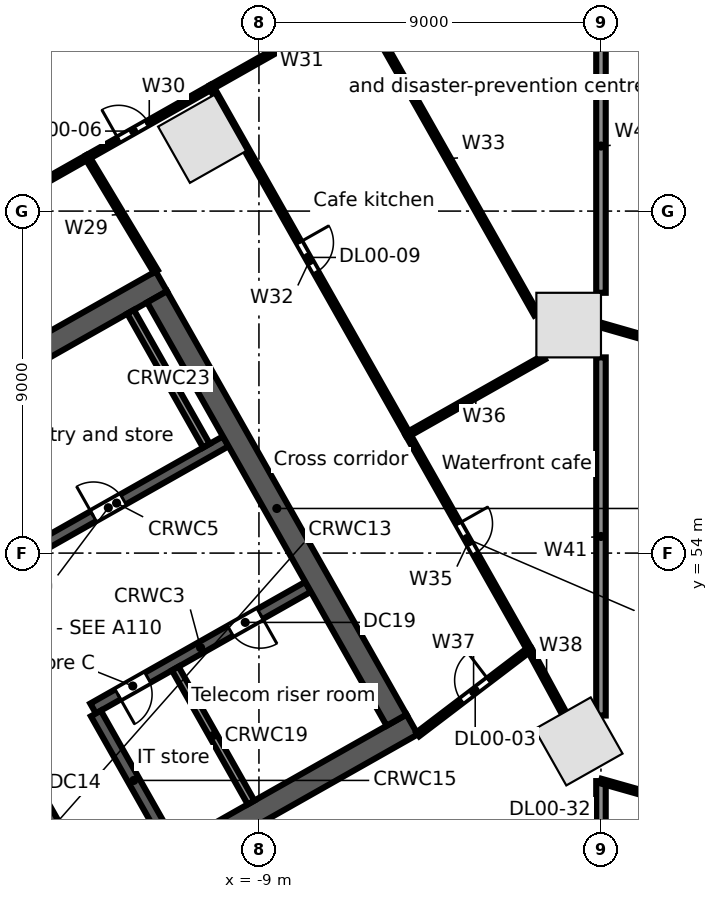
"""IFC4 building model, lengths in metres.
Left out: names, types, materials, properties, quantities, classifications, styles, units other than length and angle.
Written with IfcOpenShell. Run it as: python <this file> out.ifc"""

import sys

from ifc_helpers import new_model, si_unit, direction, frame, frame_2d, origin, origin_2d, place, context, subcontext, project, spatial, rectangle, extrude, element, fill, save


model = new_model("IFC4")
c1 = context("Model", 3, precision=1e-05, world=origin(), true_north=direction((0.0, 1.0)))
c2 = subcontext(c1, "Body", "Model", "MODEL_VIEW")
j1 = project(units=[si_unit("LENGTHUNIT", "METRE"), si_unit("PLANEANGLEUNIT", "RADIAN")], contexts=[c1])
p1 = place(None, origin())
s1 = spatial("IfcSite", under=j1, at=p1, CompositionType="ELEMENT")
p2 = place(p1, origin())
s2 = spatial("IfcBuilding", under=s1, at=p2, CompositionType="ELEMENT")
p3 = place(p2, origin())
s3 = spatial("IfcBuildingStorey", under=s2, at=p3, CompositionType="ELEMENT", Elevation=0.0)
for number, where, z_axis, x_axis in (
    (1, (-10.495, 64.902, 0.0), (0.0, 0.0, 1.0), (-0.87, -0.492, 0.0)),
    (2, (-0.591, 49.044, 0.0), (0.0, 0.0, 1.0), (0.87, 0.492, 0.0)),
    (3, (-0.85, 60.0, 0.0), (0.0, 0.0, 1.0), (0.0, 1.0, 0.0)),
):
    element("IfcColumn", number, at=place(p3, frame(where, z_axis=z_axis, x_axis=x_axis)), inside=s3, PredefinedType="COLUMN", context=c2, shape_type="SweptSolid", body=[
        extrude(rectangle(XDim=1.7, YDim=1.7, at=origin_2d()), origin(), (0.0, 0.0, 1.0), 6.5),
    ])
p4 = place(p3, frame((-63.707, 41.701, 0.0), z_axis=(0.0, 0.0, 1.0), x_axis=(0.870355510268, 0.492423888277, 0.0)))
e4 = element("IfcWall", 4, at=p4, inside=s3, PredefinedType="STANDARD", context=c2, shape_type="SweptSolid", body=[
    extrude(rectangle(XDim=67.903, YDim=0.3, at=frame_2d((33.952, 0.0))), origin(), (0.0, 0.0, 1.0), 6.15),
])
p5 = place(p4, frame((44.274, 0.0, 0.0)))
e5 = element("IfcOpeningElement", 5, at=p5, cuts=e4, PredefinedType="OPENING", context=c2, shape_type="SweptSolid", body=[
    extrude(rectangle(XDim=1.2, YDim=2.4, at=frame_2d((0.6, 1.2))), frame((0.0, 0.16, 0.0), z_axis=(0.0, -1.0, 0.0), x_axis=(1.0, 0.0, 0.0)), (0.0, 0.0, 1.0), 0.32),
])
p6 = place(p4, frame((15.222, 0.0, 0.0)))
e6 = element("IfcOpeningElement", 6, at=p6, cuts=e4, PredefinedType="OPENING", context=c2, shape_type="SweptSolid", body=[
    extrude(rectangle(XDim=1.2, YDim=2.4, at=frame_2d((0.6, 1.2))), frame((0.0, 0.16, 0.0), z_axis=(0.0, -1.0, 0.0), x_axis=(1.0, 0.0, 0.0)), (0.0, 0.0, 1.0), 0.32),
])
p7 = place(p3, frame((-18.024, 42.104, 0.0), z_axis=(0.0, 0.0, 1.0), x_axis=(0.870360574057, 0.492414937962, 0.0)))
e7 = element("IfcWall", 7, at=p7, inside=s3, PredefinedType="SOLIDWALL", context=c2, shape_type="SweptSolid", body=[
    extrude(rectangle(XDim=15.0, YDim=0.6, at=frame_2d((7.5, 0.0))), origin(), (0.0, 0.0, 1.0), 6.15),
])
p8 = place(p7, frame((6.1, 0.0, 0.0)))
e8 = element("IfcOpeningElement", 8, at=p8, cuts=e7, PredefinedType="OPENING", context=c2, shape_type="SweptSolid", body=[
    extrude(rectangle(XDim=1.2, YDim=2.1, at=frame_2d((0.6, 1.05))), frame((0.0, 0.31, 0.0), z_axis=(0.0, -1.0, 0.0), x_axis=(1.0, 0.0, 0.0)), (0.0, 0.0, 1.0), 0.62),
])
p9 = place(p3, frame((-13.365, 49.911, 0.0), z_axis=(0.0, 0.0, 1.0), x_axis=(0.870340995471, 0.49244954219, 0.0)))
e9 = element("IfcWall", 9, at=p9, inside=s3, PredefinedType="SOLIDWALL", context=c2, shape_type="SweptSolid", body=[
    extrude(rectangle(XDim=6.5, YDim=0.3, at=frame_2d((3.25, 0.0))), origin(), (0.0, 0.0, 1.0), 6.15),
])
p10 = place(p9, frame((0.75, 0.0, 0.0)))
e10 = element("IfcOpeningElement", 10, at=p10, cuts=e9, PredefinedType="OPENING", context=c2, shape_type="SweptSolid", body=[
    extrude(rectangle(XDim=0.9, YDim=2.1, at=frame_2d((0.45, 1.05))), frame((0.0, 0.16, 0.0), z_axis=(0.0, -1.0, 0.0), x_axis=(1.0, 0.0, 0.0)), (0.0, 0.0, 1.0), 0.32),
])
p11 = place(p9, frame((4.15, 0.0, 0.0)))
e11 = element("IfcOpeningElement", 11, at=p11, cuts=e9, PredefinedType="OPENING", context=c2, shape_type="SweptSolid", body=[
    extrude(rectangle(XDim=0.9, YDim=2.1, at=frame_2d((0.45, 1.05))), frame((0.0, 0.16, 0.0), z_axis=(0.0, -1.0, 0.0), x_axis=(1.0, 0.0, 0.0)), (0.0, 0.0, 1.0), 0.32),
])
p12 = place(p3, frame((-15.618, 53.691, 0.0), z_axis=(0.0, 0.0, 1.0), x_axis=(0.870356769198, 0.492421663121, 0.0)))
e12 = element("IfcWall", 12, at=p12, inside=s3, PredefinedType="SOLIDWALL", context=c2, shape_type="SweptSolid", body=[
    extrude(rectangle(XDim=6.6, YDim=0.3, at=frame_2d((3.3, 0.0))), origin(), (0.0, 0.0, 1.0), 6.15),
])
p13 = place(p12, frame((2.6, 0.0, 0.0)))
e13 = element("IfcOpeningElement", 13, at=p13, cuts=e12, PredefinedType="OPENING", context=c2, shape_type="SweptSolid", body=[
    extrude(rectangle(XDim=0.9, YDim=2.1, at=frame_2d((0.45, 1.05))), frame((0.0, 0.16, 0.0), z_axis=(0.0, -1.0, 0.0), x_axis=(1.0, 0.0, 0.0)), (0.0, 0.0, 1.0), 0.32),
])
p14 = place(p3, frame((-24.623, 53.767, 0.0), z_axis=(0.0, 0.0, 1.0), x_axis=(0.870356627484, 0.492421913601, 0.0)))
e14 = element("IfcWall", 14, at=p14, inside=s3, PredefinedType="SOLIDWALL", context=c2, shape_type="SweptSolid", body=[
    extrude(rectangle(XDim=15.0, YDim=0.6, at=frame_2d((7.5, 0.0))), origin(), (0.0, 0.0, 1.0), 6.15),
])
p15 = place(p3, frame((-16.076, 48.205, 0.0), z_axis=(0.0, 0.0, 1.0), x_axis=(0.492394910396, -0.870371904542, 0.0)))
e15 = element("IfcWall", 15, at=p15, inside=s3, PredefinedType="SOLIDWALL", context=c2, shape_type="SweptSolid", body=[
    extrude(rectangle(XDim=4.05, YDim=0.2, at=frame_2d((2.025, 0.0))), origin(), (0.0, 0.0, 1.0), 6.15),
])
for number, where, z_axis, x_axis in (
    (16, (-15.379, 48.599, 0.0), (0.0, 0.0, 1.0), (0.492, -0.87, 0.0)),
    (17, (-13.291, 49.781, 0.0), (0.0, 0.0, 1.0), (0.492, -0.87, 0.0)),
):
    element("IfcWall", number, at=place(p3, frame(where, z_axis=z_axis, x_axis=x_axis)), inside=s3, PredefinedType="SOLIDWALL", context=c2, shape_type="SweptSolid", body=[
        extrude(rectangle(XDim=4.05, YDim=0.3, at=frame_2d((2.025, 0.0))), origin(), (0.0, 0.0, 1.0), 6.15),
    ])
p16 = place(p3, frame((-11.202, 50.962, 0.0), z_axis=(0.0, 0.0, 1.0), x_axis=(0.49241474071, -0.870360685654, 0.0)))
e18 = element("IfcWall", 18, at=p16, inside=s3, PredefinedType="PARTITIONING", context=c2, shape_type="SweptSolid", body=[
    extrude(rectangle(XDim=4.05, YDim=0.2, at=frame_2d((2.025, 0.0))), origin(), (0.0, 0.0, 1.0), 6.15),
])
p17 = place(p3, frame((-12.377, 60.351, 0.0), z_axis=(0.0, 0.0, 1.0), x_axis=(0.492440575896, -0.870346068648, 0.0)))
e19 = element("IfcWall", 19, at=p17, inside=s3, PredefinedType="SOLIDWALL", context=c2, shape_type="SweptSolid", body=[
    extrude(rectangle(XDim=4.05, YDim=0.2, at=frame_2d((2.025, 0.0))), origin(), (0.0, 0.0, 1.0), 6.15),
])
p18 = place(p3, frame((-11.681, 60.744, 0.0), z_axis=(0.0, 0.0, 1.0), x_axis=(0.492426772896, -0.870353878221, 0.0)))
e20 = element("IfcWall", 20, at=p18, inside=s3, PredefinedType="SOLIDWALL", context=c2, shape_type="SweptSolid", body=[
    extrude(rectangle(XDim=12.8, YDim=0.6, at=frame_2d((6.4, 0.0))), origin(), (0.0, 0.0, 1.0), 6.15),
])
p19 = place(p3, frame((-20.046, 60.723, 0.0), z_axis=(0.0, 0.0, 1.0), x_axis=(0.870364520461, 0.492407962489, 0.0)))
e21 = element("IfcWall", 21, at=p19, inside=s3, PredefinedType="PARTITIONING", context=c2, shape_type="SweptSolid", body=[
    extrude(rectangle(XDim=7.5, YDim=0.125, at=frame_2d((3.75, 0.0))), origin(), (0.0, 0.0, 1.0), 5.43),
])
p20 = place(p19, frame((3.2, 0.0, 0.0)))
e22 = element("IfcOpeningElement", 22, at=p20, cuts=e21, PredefinedType="OPENING", context=c2, shape_type="SweptSolid", body=[
    extrude(rectangle(XDim=0.9, YDim=2.1, at=frame_2d((0.45, 1.05))), frame((0.0, 0.073, 0.0), z_axis=(0.0, -1.0, 0.0), x_axis=(1.0, 0.0, 0.0)), (0.0, 0.0, 1.0), 0.145),
])
p21 = place(p3, frame((-13.518, 64.416, 0.0), z_axis=(0.0, 0.0, 1.0), x_axis=(0.514875058642, -0.857265229663, 0.0)))
e23 = element("IfcWall", 23, at=p21, inside=s3, PredefinedType="PARTITIONING", context=c2, shape_type="SweptSolid", body=[
    extrude(rectangle(XDim=3.502, YDim=0.125, at=frame_2d((1.751, 0.0))), origin(), (0.0, 0.0, 1.0), 5.43),
])
p22 = place(p3, frame((-13.518, 64.416, 0.0), z_axis=(0.0, 0.0, 1.0), x_axis=(0.870338454914, 0.492454032268, 0.0)))
e24 = element("IfcWall", 24, at=p22, inside=s3, PredefinedType="PARTITIONING", context=c2, shape_type="SweptSolid", body=[
    extrude(rectangle(XDim=3.75, YDim=0.125, at=frame_2d((1.875, 0.0))), origin(), (0.0, 0.0, 1.0), 5.212),
])
p23 = place(p22, frame((0.95, 0.0, 0.0)))
e25 = element("IfcOpeningElement", 25, at=p23, cuts=e24, PredefinedType="OPENING", context=c2, shape_type="SweptSolid", body=[
    extrude(rectangle(XDim=0.9, YDim=2.1, at=frame_2d((0.45, 1.05))), frame((0.0, 0.073, 0.0), z_axis=(0.0, -1.0, 0.0), x_axis=(1.0, 0.0, 0.0)), (0.0, 0.0, 1.0), 0.145),
])
p24 = place(p3, frame((-10.254, 66.263, 0.0), z_axis=(0.0, 0.0, 1.0), x_axis=(0.870454697906, 0.492248533664, 0.0)))
e26 = element("IfcWall", 26, at=p24, inside=s3, PredefinedType="PARTITIONING", context=c2, shape_type="SweptSolid", body=[
    extrude(rectangle(XDim=4.5, YDim=0.125, at=frame_2d((2.25, 0.0))), origin(), (0.0, 0.0, 1.0), 6.15),
])
p25 = place(p3, frame((-10.254, 66.263, 0.0), z_axis=(0.0, 0.0, 1.0), x_axis=(0.492448703838, -0.87034146982, 0.0)))
e27 = element("IfcWall", 27, at=p25, inside=s3, PredefinedType="PARTITIONING", context=c2, shape_type="SweptSolid", body=[
    extrude(rectangle(XDim=10.5, YDim=0.125, at=frame_2d((5.25, 0.0))), origin(), (0.0, 0.0, 1.0), 5.212),
])
p26 = place(p25, frame((4.7, 0.0, 0.0)))
e28 = element("IfcOpeningElement", 28, at=p26, cuts=e27, PredefinedType="OPENING", context=c2, shape_type="SweptSolid", body=[
    extrude(rectangle(XDim=0.9, YDim=2.1, at=frame_2d((0.45, 1.05))), frame((0.0, 0.073, 0.0), z_axis=(0.0, -1.0, 0.0), x_axis=(1.0, 0.0, 0.0)), (0.0, 0.0, 1.0), 0.145),
])
p27 = place(p3, frame((-6.337, 68.478, 0.0), z_axis=(0.0, 0.0, 1.0), x_axis=(0.492412602502, -0.870361895361, 0.0)))
e29 = element("IfcWall", 29, at=p27, inside=s3, PredefinedType="PARTITIONING", context=c2, shape_type="SweptSolid", body=[
    extrude(rectangle(XDim=9.417, YDim=0.125, at=frame_2d((4.708, 0.0))), origin(), (0.0, 0.0, 1.0), 5.212),
])
p28 = place(p3, frame((-5.083, 57.124, 0.0), z_axis=(0.0, 0.0, 1.0), x_axis=(0.49235182095, -0.870396280097, 0.0)))
e30 = element("IfcWall", 30, at=p28, inside=s3, PredefinedType="PARTITIONING", context=c2, shape_type="SweptSolid", body=[
    extrude(rectangle(XDim=6.499, YDim=0.125, at=frame_2d((3.25, 0.0))), origin(), (0.0, 0.0, 1.0), 6.15),
])
p29 = place(p28, frame((2.7, 0.0, 0.0)))
e31 = element("IfcOpeningElement", 31, at=p29, cuts=e30, PredefinedType="OPENING", context=c2, shape_type="SweptSolid", body=[
    extrude(rectangle(XDim=0.9, YDim=2.1, at=frame_2d((0.45, 1.05))), frame((0.0, 0.073, 0.0), z_axis=(0.0, -1.0, 0.0), x_axis=(1.0, 0.0, 0.0)), (0.0, 0.0, 1.0), 0.145),
])
p30 = place(p3, frame((-5.083, 57.124, 0.0), z_axis=(0.0, 0.0, 1.0), x_axis=(0.870317335247, 0.492491356238, 0.0)))
e32 = element("IfcWall", 32, at=p30, inside=s3, PredefinedType="PARTITIONING", context=c2, shape_type="SweptSolid", body=[
    extrude(rectangle(XDim=4.114, YDim=0.125, at=frame_2d((2.057, 0.0))), origin(), (0.0, 0.0, 1.0), 5.212),
])
p31 = place(p3, frame((-4.821, 49.23, 0.0), z_axis=(0.0, 0.0, 1.0), x_axis=(0.795615322848, 0.605802160816, 0.0)))
e33 = element("IfcWall", 33, at=p31, inside=s3, PredefinedType="PARTITIONING", context=c2, shape_type="SweptSolid", body=[
    extrude(rectangle(XDim=3.693, YDim=0.125, at=frame_2d((1.846, 0.0))), origin(), (0.0, 0.0, 1.0), 6.15),
])
p32 = place(p31, frame((1.45, 0.0, 0.0)))
e34 = element("IfcOpeningElement", 34, at=p32, cuts=e33, PredefinedType="OPENING", context=c2, shape_type="SweptSolid", body=[
    extrude(rectangle(XDim=0.9, YDim=2.1, at=frame_2d((0.45, 1.05))), frame((0.0, 0.073, 0.0), z_axis=(0.0, -1.0, 0.0), x_axis=(1.0, 0.0, 0.0)), (0.0, 0.0, 1.0), 0.145),
])
p33 = place(p3, frame((-1.883, 51.467, 0.0), z_axis=(0.0, 0.0, 1.0), x_axis=(0.477162952876, -0.878814836244, 0.0)))
e35 = element("IfcWall", 35, at=p33, inside=s3, PredefinedType="PARTITIONING", context=c2, shape_type="SweptSolid", body=[
    extrude(rectangle(XDim=1.895, YDim=0.125, at=frame_2d((0.947, 0.0))), origin(), (0.0, 0.0, 1.0), 6.15),
])
p34 = place(p3, frame((0.0, 43.806, 0.0), z_axis=(0.0, 0.0, 1.0), x_axis=(0.0, 1.0, 0.0)))
e36 = element("IfcWall", 36, at=p34, inside=s3, PredefinedType="PARTITIONING", context=c2, shape_type="SweptSolid", body=[
    extrude(rectangle(XDim=4.194, YDim=0.25, at=frame_2d((2.097, 0.0))), origin(), (0.0, 0.0, 1.0), 5.212),
])
p35 = place(p34, frame((1.2, 0.0, 0.0)))
e37 = element("IfcOpeningElement", 37, at=p35, cuts=e36, PredefinedType="OPENING", context=c2, shape_type="SweptSolid", body=[
    extrude(rectangle(XDim=1.8, YDim=2.1, at=frame_2d((0.9, 1.05))), frame((0.0, 0.135, 0.0), z_axis=(0.0, -1.0, 0.0), x_axis=(1.0, 0.0, 0.0)), (0.0, 0.0, 1.0), 0.27),
])
p36 = place(p3, frame((0.0, 48.0, 0.0), z_axis=(0.0, 0.0, 1.0), x_axis=(0.962053342028, -0.27286144303, 0.0)))
e38 = element("IfcWall", 38, at=p36, inside=s3, PredefinedType="PARTITIONING", context=c2, shape_type="SweptSolid", body=[
    extrude(rectangle(XDim=12.193, YDim=0.125, at=frame_2d((6.096, 0.0))), origin(), (0.0, 0.0, 1.0), 5.53),
])
p37 = place(p36, frame((5.7, 0.0, 0.0)))
e39 = element("IfcOpeningElement", 39, at=p37, cuts=e38, PredefinedType="OPENING", context=c2, shape_type="SweptSolid", body=[
    extrude(rectangle(XDim=0.9, YDim=2.1, at=frame_2d((0.45, 1.05))), frame((0.0, 0.073, 0.0), z_axis=(0.0, -1.0, 0.0), x_axis=(1.0, 0.0, 0.0)), (0.0, 0.0, 1.0), 0.145),
])
p38 = place(p3, frame((0.0, 49.726, 0.0), z_axis=(0.0, 0.0, 1.0), x_axis=(0.0, 1.0, 0.0)))
e40 = element("IfcWall", 40, at=p38, inside=s3, PredefinedType="PARTITIONING", context=c2, shape_type="SweptSolid", body=[
    extrude(rectangle(XDim=9.424, YDim=0.25, at=frame_2d((4.712, 0.0))), origin(), (0.0, 0.0, 1.0), 6.15),
])
p39 = place(p3, frame((0.0, 60.0, 0.0), z_axis=(0.0, 0.0, 1.0), x_axis=(0.961263282922, -0.275631821288, 0.0)))
e41 = element("IfcWall", 41, at=p39, inside=s3, PredefinedType="PARTITIONING", context=c2, shape_type="SweptSolid", body=[
    extrude(rectangle(XDim=9.063, YDim=0.125, at=frame_2d((4.531, 0.0))), origin(), (0.0, 0.0, 1.0), 5.212),
])
p40 = place(p3, frame((0.0, 60.85, 0.0), z_axis=(0.0, 0.0, 1.0), x_axis=(0.0, 1.0, 0.0)))
e42 = element("IfcWall", 42, at=p40, inside=s3, PredefinedType="PARTITIONING", context=c2, shape_type="SweptSolid", body=[
    extrude(rectangle(XDim=7.723, YDim=0.25, at=frame_2d((3.861, 0.0))), origin(), (0.0, 0.0, 1.0), 5.43),
])
p41 = place(p13, origin())
e43 = element("IfcDoor", 43, at=p41, inside=s3, OperationType="SINGLE_SWING_LEFT", PredefinedType="DOOR", context=c2, shape_type="SweptSolid", body=[
    extrude(rectangle(XDim=0.9, YDim=2.1, at=frame_2d((0.45, 1.05))), frame((0.0, 0.025, 0.0), z_axis=(0.0, -1.0, 0.0), x_axis=(1.0, 0.0, 0.0)), (0.0, 0.0, 1.0), 0.05),
])
fill(e13, e43)
p42 = place(p10, frame((0.9, 0.0, 0.0), z_axis=(0.0, 0.0, 1.0), x_axis=(-1.0, 0.0, 0.0)))
e44 = element("IfcDoor", 44, at=p42, inside=s3, OperationType="SINGLE_SWING_RIGHT", PredefinedType="DOOR", context=c2, shape_type="SweptSolid", body=[
    extrude(rectangle(XDim=0.9, YDim=2.1, at=frame_2d((0.45, 1.05))), frame((0.0, 0.025, 0.0), z_axis=(0.0, -1.0, 0.0), x_axis=(1.0, 0.0, 0.0)), (0.0, 0.0, 1.0), 0.05),
])
fill(e10, e44)
p43 = place(p11, frame((0.9, 0.0, 0.0), z_axis=(0.0, 0.0, 1.0), x_axis=(-1.0, 0.0, 0.0)))
e45 = element("IfcDoor", 45, at=p43, inside=s3, OperationType="SINGLE_SWING_LEFT", PredefinedType="DOOR", context=c2, shape_type="SweptSolid", body=[
    extrude(rectangle(XDim=0.9, YDim=2.1, at=frame_2d((0.45, 1.05))), frame((0.0, 0.025, 0.0), z_axis=(0.0, -1.0, 0.0), x_axis=(1.0, 0.0, 0.0)), (0.0, 0.0, 1.0), 0.05),
])
fill(e11, e45)
p44 = place(p32, origin())
e46 = element("IfcDoor", 46, at=p44, inside=s3, OperationType="SINGLE_SWING_RIGHT", PredefinedType="DOOR", context=c2, shape_type="SweptSolid", body=[
    extrude(rectangle(XDim=0.9, YDim=2.1, at=frame_2d((0.45, 1.05))), frame((0.0, 0.025, 0.0), z_axis=(0.0, -1.0, 0.0), x_axis=(1.0, 0.0, 0.0)), (0.0, 0.0, 1.0), 0.05),
])
fill(e34, e46)
p45 = place(p23, origin())
e47 = element("IfcDoor", 47, at=p45, inside=s3, OperationType="SINGLE_SWING_LEFT", PredefinedType="DOOR", context=c2, shape_type="SweptSolid", body=[
    extrude(rectangle(XDim=0.9, YDim=2.1, at=frame_2d((0.45, 1.05))), frame((0.0, 0.025, 0.0), z_axis=(0.0, -1.0, 0.0), x_axis=(1.0, 0.0, 0.0)), (0.0, 0.0, 1.0), 0.05),
])
fill(e25, e47)
p46 = place(p26, origin())
e48 = element("IfcDoor", 48, at=p46, inside=s3, OperationType="SINGLE_SWING_LEFT", PredefinedType="DOOR", context=c2, shape_type="SweptSolid", body=[
    extrude(rectangle(XDim=0.9, YDim=2.1, at=frame_2d((0.45, 1.05))), frame((0.0, 0.025, 0.0), z_axis=(0.0, -1.0, 0.0), x_axis=(1.0, 0.0, 0.0)), (0.0, 0.0, 1.0), 0.05),
])
fill(e28, e48)
p47 = place(p29, origin())
e49 = element("IfcDoor", 49, at=p47, inside=s3, OperationType="SINGLE_SWING_LEFT", PredefinedType="DOOR", context=c2, shape_type="SweptSolid", body=[
    extrude(rectangle(XDim=0.9, YDim=2.1, at=frame_2d((0.45, 1.05))), frame((0.0, 0.025, 0.0), z_axis=(0.0, -1.0, 0.0), x_axis=(1.0, 0.0, 0.0)), (0.0, 0.0, 1.0), 0.05),
])
fill(e31, e49)
save(model, sys.argv[1])
